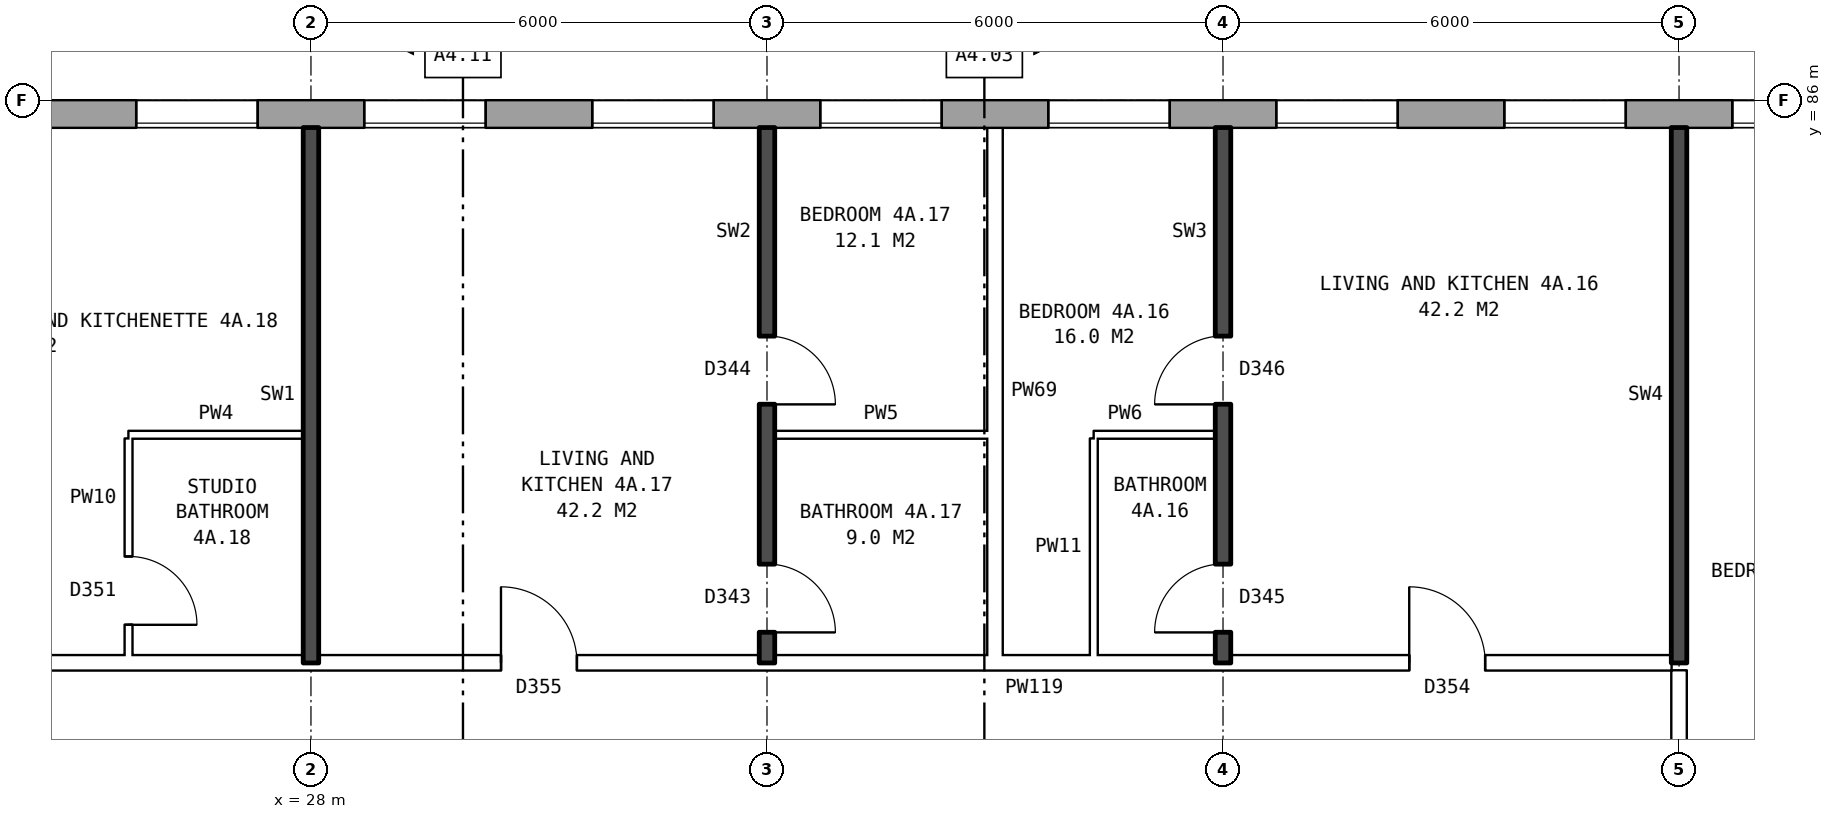
"""IFC4 building model, lengths in metres.
Left out: names, types, materials, properties, quantities, classifications, styles, units other than length and angle.
Written with IfcOpenShell. Run it as: python <this file> out.ifc"""

import sys

from ifc_helpers import new_model, si_unit, direction, frame, frame_2d, origin, place, context, subcontext, project, spatial, rectangle, extrude, element, fill, save


model = new_model("IFC4")
c1 = context("Model", 3, precision=1e-05, world=origin(), true_north=direction((0.0, 1.0)))
c2 = subcontext(c1, "Body", "Model", "MODEL_VIEW")
j1 = project(units=[si_unit("LENGTHUNIT", "METRE"), si_unit("PLANEANGLEUNIT", "RADIAN")], contexts=[c1])
p1 = place(None, origin())
s1 = spatial("IfcSite", under=j1, at=p1, CompositionType="ELEMENT")
p2 = place(p1, origin())
s2 = spatial("IfcBuilding", under=s1, at=p2, CompositionType="ELEMENT")
p3 = place(p2, frame((0.0, 0.0, 19.5)))
s3 = spatial("IfcBuildingStorey", under=s2, at=p3, CompositionType="ELEMENT", Elevation=19.5)
p4 = place(p3, frame((72.925, 85.82, 0.0), z_axis=(0.0, 0.0, 1.0), x_axis=(-1.0, 0.0, 0.0)))
e1 = element("IfcWall", 1, at=p4, inside=s3, PredefinedType="STANDARD", context=c2, shape_type="SweptSolid", body=[
    extrude(rectangle(XDim=50.101, YDim=0.36, at=frame_2d((25.05, 0.0))), origin(), (0.0, 0.0, 1.0), 2.85),
])
p5 = place(p4, frame((0.75, 0.0, 0.8)))
e2 = element("IfcOpeningElement", 2, at=p5, cuts=e1, PredefinedType="OPENING", context=c2, shape_type="SweptSolid", body=[
    extrude(rectangle(XDim=0.6, YDim=0.9, at=frame_2d((0.3, 0.45))), frame((0.0, 0.19, 0.0), z_axis=(0.0, -1.0, 0.0), x_axis=(1.0, 0.0, 0.0)), (0.0, 0.0, 1.0), 0.38),
])
p6 = place(p4, frame((3.625, 0.0, 0.8)))
e3 = element("IfcOpeningElement", 3, at=p6, cuts=e1, PredefinedType="OPENING", context=c2, shape_type="SweptSolid", body=[
    extrude(rectangle(XDim=1.6, YDim=1.8, at=frame_2d((0.8, 0.9))), frame((0.0, 0.19, 0.0), z_axis=(0.0, -1.0, 0.0), x_axis=(1.0, 0.0, 0.0)), (0.0, 0.0, 1.0), 0.38),
])
p7 = place(p4, frame((6.625, 0.0, 0.8)))
e4 = element("IfcOpeningElement", 4, at=p7, cuts=e1, PredefinedType="OPENING", context=c2, shape_type="SweptSolid", body=[
    extrude(rectangle(XDim=1.6, YDim=1.8, at=frame_2d((0.8, 0.9))), frame((0.0, 0.19, 0.0), z_axis=(0.0, -1.0, 0.0), x_axis=(1.0, 0.0, 0.0)), (0.0, 0.0, 1.0), 0.38),
])
p8 = place(p4, frame((9.625, 0.0, 0.8)))
e5 = element("IfcOpeningElement", 5, at=p8, cuts=e1, PredefinedType="OPENING", context=c2, shape_type="SweptSolid", body=[
    extrude(rectangle(XDim=1.6, YDim=1.8, at=frame_2d((0.8, 0.9))), frame((0.0, 0.19, 0.0), z_axis=(0.0, -1.0, 0.0), x_axis=(1.0, 0.0, 0.0)), (0.0, 0.0, 1.0), 0.38),
])
p9 = place(p4, frame((12.625, 0.0, 0.8)))
e6 = element("IfcOpeningElement", 6, at=p9, cuts=e1, PredefinedType="OPENING", context=c2, shape_type="SweptSolid", body=[
    extrude(rectangle(XDim=1.6, YDim=1.8, at=frame_2d((0.8, 0.9))), frame((0.0, 0.19, 0.0), z_axis=(0.0, -1.0, 0.0), x_axis=(1.0, 0.0, 0.0)), (0.0, 0.0, 1.0), 0.38),
])
p10 = place(p4, frame((15.625, 0.0, 0.8)))
e7 = element("IfcOpeningElement", 7, at=p10, cuts=e1, PredefinedType="OPENING", context=c2, shape_type="SweptSolid", body=[
    extrude(rectangle(XDim=1.6, YDim=1.8, at=frame_2d((0.8, 0.9))), frame((0.0, 0.19, 0.0), z_axis=(0.0, -1.0, 0.0), x_axis=(1.0, 0.0, 0.0)), (0.0, 0.0, 1.0), 0.38),
])
p11 = place(p4, frame((18.625, 0.0, 0.8)))
e8 = element("IfcOpeningElement", 8, at=p11, cuts=e1, PredefinedType="OPENING", context=c2, shape_type="SweptSolid", body=[
    extrude(rectangle(XDim=1.6, YDim=1.8, at=frame_2d((0.8, 0.9))), frame((0.0, 0.19, 0.0), z_axis=(0.0, -1.0, 0.0), x_axis=(1.0, 0.0, 0.0)), (0.0, 0.0, 1.0), 0.38),
])
p12 = place(p4, frame((21.625, 0.0, 0.8)))
e9 = element("IfcOpeningElement", 9, at=p12, cuts=e1, PredefinedType="OPENING", context=c2, shape_type="SweptSolid", body=[
    extrude(rectangle(XDim=1.6, YDim=1.8, at=frame_2d((0.8, 0.9))), frame((0.0, 0.19, 0.0), z_axis=(0.0, -1.0, 0.0), x_axis=(1.0, 0.0, 0.0)), (0.0, 0.0, 1.0), 0.38),
])
p13 = place(p4, frame((24.625, 0.0, 0.8)))
e10 = element("IfcOpeningElement", 10, at=p13, cuts=e1, PredefinedType="OPENING", context=c2, shape_type="SweptSolid", body=[
    extrude(rectangle(XDim=1.6, YDim=1.8, at=frame_2d((0.8, 0.9))), frame((0.0, 0.19, 0.0), z_axis=(0.0, -1.0, 0.0), x_axis=(1.0, 0.0, 0.0)), (0.0, 0.0, 1.0), 0.38),
])
p14 = place(p4, frame((27.625, 0.0, 0.8)))
e11 = element("IfcOpeningElement", 11, at=p14, cuts=e1, PredefinedType="OPENING", context=c2, shape_type="SweptSolid", body=[
    extrude(rectangle(XDim=1.6, YDim=1.8, at=frame_2d((0.8, 0.9))), frame((0.0, 0.19, 0.0), z_axis=(0.0, -1.0, 0.0), x_axis=(1.0, 0.0, 0.0)), (0.0, 0.0, 1.0), 0.38),
])
p15 = place(p4, frame((30.625, 0.0, 0.8)))
e12 = element("IfcOpeningElement", 12, at=p15, cuts=e1, PredefinedType="OPENING", context=c2, shape_type="SweptSolid", body=[
    extrude(rectangle(XDim=1.6, YDim=1.8, at=frame_2d((0.8, 0.9))), frame((0.0, 0.19, 0.0), z_axis=(0.0, -1.0, 0.0), x_axis=(1.0, 0.0, 0.0)), (0.0, 0.0, 1.0), 0.38),
])
p16 = place(p4, frame((33.625, 0.0, 0.8)))
e13 = element("IfcOpeningElement", 13, at=p16, cuts=e1, PredefinedType="OPENING", context=c2, shape_type="SweptSolid", body=[
    extrude(rectangle(XDim=1.6, YDim=1.8, at=frame_2d((0.8, 0.9))), frame((0.0, 0.19, 0.0), z_axis=(0.0, -1.0, 0.0), x_axis=(1.0, 0.0, 0.0)), (0.0, 0.0, 1.0), 0.38),
])
p17 = place(p4, frame((36.625, 0.0, 0.8)))
e14 = element("IfcOpeningElement", 14, at=p17, cuts=e1, PredefinedType="OPENING", context=c2, shape_type="SweptSolid", body=[
    extrude(rectangle(XDim=1.6, YDim=1.8, at=frame_2d((0.8, 0.9))), frame((0.0, 0.19, 0.0), z_axis=(0.0, -1.0, 0.0), x_axis=(1.0, 0.0, 0.0)), (0.0, 0.0, 1.0), 0.38),
])
p18 = place(p4, frame((39.625, 0.0, 0.8)))
e15 = element("IfcOpeningElement", 15, at=p18, cuts=e1, PredefinedType="OPENING", context=c2, shape_type="SweptSolid", body=[
    extrude(rectangle(XDim=1.6, YDim=1.8, at=frame_2d((0.8, 0.9))), frame((0.0, 0.19, 0.0), z_axis=(0.0, -1.0, 0.0), x_axis=(1.0, 0.0, 0.0)), (0.0, 0.0, 1.0), 0.38),
])
p19 = place(p4, frame((42.625, 0.0, 0.8)))
e16 = element("IfcOpeningElement", 16, at=p19, cuts=e1, PredefinedType="OPENING", context=c2, shape_type="SweptSolid", body=[
    extrude(rectangle(XDim=1.6, YDim=1.8, at=frame_2d((0.8, 0.9))), frame((0.0, 0.19, 0.0), z_axis=(0.0, -1.0, 0.0), x_axis=(1.0, 0.0, 0.0)), (0.0, 0.0, 1.0), 0.38),
])
p20 = place(p4, frame((45.625, 0.0, 0.8)))
e17 = element("IfcOpeningElement", 17, at=p20, cuts=e1, PredefinedType="OPENING", context=c2, shape_type="SweptSolid", body=[
    extrude(rectangle(XDim=1.6, YDim=1.8, at=frame_2d((0.8, 0.9))), frame((0.0, 0.19, 0.0), z_axis=(0.0, -1.0, 0.0), x_axis=(1.0, 0.0, 0.0)), (0.0, 0.0, 1.0), 0.38),
])
p21 = place(p4, frame((1.65, 0.0, 0.8)))
e18 = element("IfcOpeningElement", 18, at=p21, cuts=e1, PredefinedType="OPENING", context=c2, shape_type="SweptSolid", body=[
    extrude(rectangle(XDim=1.0, YDim=1.5, at=frame_2d((0.5, 0.75))), frame((0.0, 0.19, 0.0), z_axis=(0.0, -1.0, 0.0), x_axis=(1.0, 0.0, 0.0)), (0.0, 0.0, 1.0), 0.38),
])
p22 = place(p3, frame((20.11, 78.6, 0.0), z_axis=(0.0, 0.0, 1.0), x_axis=(1.0, 0.0, 0.0)))
e19 = element("IfcWall", 19, at=p22, inside=s3, PredefinedType="PARTITIONING", context=c2, shape_type="SweptSolid", body=[
    extrude(rectangle(XDim=25.79, YDim=0.2, at=frame_2d((12.895, 0.0))), origin(), (0.0, 0.0, 1.0), 2.85),
])
p23 = place(p22, frame((22.34, 0.0, 0.0)))
e20 = element("IfcOpeningElement", 20, at=p23, cuts=e19, PredefinedType="OPENING", context=c2, shape_type="SweptSolid", body=[
    extrude(rectangle(XDim=1.0, YDim=2.1, at=frame_2d((0.5, 1.05))), frame((0.0, 0.11, 0.0), z_axis=(0.0, -1.0, 0.0), x_axis=(1.0, 0.0, 0.0)), (0.0, 0.0, 1.0), 0.22),
])
p24 = place(p22, frame((10.39, 0.0, 0.0)))
e21 = element("IfcOpeningElement", 21, at=p24, cuts=e19, PredefinedType="OPENING", context=c2, shape_type="SweptSolid", body=[
    extrude(rectangle(XDim=1.0, YDim=2.1, at=frame_2d((0.5, 1.05))), frame((0.0, 0.11, 0.0), z_axis=(0.0, -1.0, 0.0), x_axis=(1.0, 0.0, 0.0)), (0.0, 0.0, 1.0), 0.22),
])
p25 = place(p22, frame((2.245, 0.0, 0.0)))
e22 = element("IfcOpeningElement", 22, at=p25, cuts=e19, PredefinedType="OPENING", context=c2, shape_type="SweptSolid", body=[
    extrude(rectangle(XDim=1.0, YDim=2.1, at=frame_2d((0.5, 1.05))), frame((0.0, 0.11, 0.0), z_axis=(0.0, -1.0, 0.0), x_axis=(1.0, 0.0, 0.0)), (0.0, 0.0, 1.0), 0.22),
])
p26 = place(p3, frame((25.6, 81.6, 0.0), z_axis=(0.0, 0.0, 1.0), x_axis=(1.0, 0.0, 0.0)))
e23 = element("IfcWall", 23, at=p26, inside=s3, PredefinedType="PARTITIONING", context=c2, shape_type="SweptSolid", body=[
    extrude(rectangle(XDim=2.3, YDim=0.1, at=frame_2d((1.15, 0.0))), origin(), (0.0, 0.0, 1.0), 2.85),
])
p27 = place(p3, frame((34.1, 81.6, 0.0), z_axis=(0.0, 0.0, 1.0), x_axis=(1.0, 0.0, 0.0)))
e24 = element("IfcWall", 24, at=p27, inside=s3, PredefinedType="PARTITIONING", context=c2, shape_type="SweptSolid", body=[
    extrude(rectangle(XDim=2.8, YDim=0.1, at=frame_2d((1.4, 0.0))), origin(), (0.0, 0.0, 1.0), 2.85),
])
p28 = place(p3, frame((38.3, 81.6, 0.0), z_axis=(0.0, 0.0, 1.0), x_axis=(1.0, 0.0, 0.0)))
e25 = element("IfcWall", 25, at=p28, inside=s3, PredefinedType="PARTITIONING", context=c2, shape_type="SweptSolid", body=[
    extrude(rectangle(XDim=1.6, YDim=0.1, at=frame_2d((0.8, 0.0))), origin(), (0.0, 0.0, 1.0), 2.85),
])
p29 = place(p3, frame((25.6, 78.7, 0.0), z_axis=(0.0, 0.0, 1.0), x_axis=(0.0, 1.0, 0.0)))
e26 = element("IfcWall", 26, at=p29, inside=s3, PredefinedType="PARTITIONING", context=c2, shape_type="SweptSolid", body=[
    extrude(rectangle(XDim=2.85, YDim=0.1, at=frame_2d((1.425, 0.0))), origin(), (0.0, 0.0, 1.0), 2.85),
])
p30 = place(p29, frame((0.4, 0.0, 0.0)))
e27 = element("IfcOpeningElement", 27, at=p30, cuts=e26, PredefinedType="OPENING", context=c2, shape_type="SweptSolid", body=[
    extrude(rectangle(XDim=0.9, YDim=2.1, at=frame_2d((0.45, 1.05))), frame((0.0, 0.06, 0.0), z_axis=(0.0, -1.0, 0.0), x_axis=(1.0, 0.0, 0.0)), (0.0, 0.0, 1.0), 0.12),
])
p31 = place(p3, frame((28.0, 78.6, 0.0), z_axis=(0.0, 0.0, 1.0), x_axis=(0.0, 1.0, 0.0)))
e28 = element("IfcWall", 28, at=p31, inside=s3, PredefinedType="SOLIDWALL", context=c2, shape_type="SweptSolid", body=[
    extrude(rectangle(XDim=7.04, YDim=0.2, at=frame_2d((3.52, 0.0))), origin(), (0.0, 0.0, 1.0), 2.85),
])
p32 = place(p3, frame((34.0, 78.6, 0.0), z_axis=(0.0, 0.0, 1.0), x_axis=(0.0, 1.0, 0.0)))
e29 = element("IfcWall", 29, at=p32, inside=s3, PredefinedType="SOLIDWALL", context=c2, shape_type="SweptSolid", body=[
    extrude(rectangle(XDim=7.04, YDim=0.2, at=frame_2d((3.52, 0.0))), origin(), (0.0, 0.0, 1.0), 2.85),
])
p33 = place(p32, frame((3.4, 0.0, 0.0)))
e30 = element("IfcOpeningElement", 30, at=p33, cuts=e29, PredefinedType="OPENING", context=c2, shape_type="SweptSolid", body=[
    extrude(rectangle(XDim=0.9, YDim=2.1, at=frame_2d((0.45, 1.05))), frame((0.0, 0.11, 0.0), z_axis=(0.0, -1.0, 0.0), x_axis=(1.0, 0.0, 0.0)), (0.0, 0.0, 1.0), 0.22),
])
p34 = place(p32, frame((0.4, 0.0, 0.0)))
e31 = element("IfcOpeningElement", 31, at=p34, cuts=e29, PredefinedType="OPENING", context=c2, shape_type="SweptSolid", body=[
    extrude(rectangle(XDim=0.9, YDim=2.1, at=frame_2d((0.45, 1.05))), frame((0.0, 0.11, 0.0), z_axis=(0.0, -1.0, 0.0), x_axis=(1.0, 0.0, 0.0)), (0.0, 0.0, 1.0), 0.22),
])
p35 = place(p3, frame((37.0, 78.7, 0.0), z_axis=(0.0, 0.0, 1.0), x_axis=(0.0, 1.0, 0.0)))
e32 = element("IfcWall", 32, at=p35, inside=s3, PredefinedType="PARTITIONING", context=c2, shape_type="SweptSolid", body=[
    extrude(rectangle(XDim=6.94, YDim=0.2, at=frame_2d((3.47, 0.0))), origin(), (0.0, 0.0, 1.0), 2.85),
])
p36 = place(p3, frame((38.3, 78.7, 0.0), z_axis=(0.0, 0.0, 1.0), x_axis=(0.0, 1.0, 0.0)))
e33 = element("IfcWall", 33, at=p36, inside=s3, PredefinedType="PARTITIONING", context=c2, shape_type="SweptSolid", body=[
    extrude(rectangle(XDim=2.85, YDim=0.1, at=frame_2d((1.425, 0.0))), origin(), (0.0, 0.0, 1.0), 2.85),
])
p37 = place(p3, frame((40.0, 78.6, 0.0), z_axis=(0.0, 0.0, 1.0), x_axis=(0.0, 1.0, 0.0)))
e34 = element("IfcWall", 34, at=p37, inside=s3, PredefinedType="SOLIDWALL", context=c2, shape_type="SweptSolid", body=[
    extrude(rectangle(XDim=7.04, YDim=0.2, at=frame_2d((3.52, 0.0))), origin(), (0.0, 0.0, 1.0), 2.85),
])
p38 = place(p37, frame((3.4, 0.0, 0.0)))
e35 = element("IfcOpeningElement", 35, at=p38, cuts=e34, PredefinedType="OPENING", context=c2, shape_type="SweptSolid", body=[
    extrude(rectangle(XDim=0.9, YDim=2.1, at=frame_2d((0.45, 1.05))), frame((0.0, 0.11, 0.0), z_axis=(0.0, -1.0, 0.0), x_axis=(1.0, 0.0, 0.0)), (0.0, 0.0, 1.0), 0.22),
])
p39 = place(p37, frame((0.4, 0.0, 0.0)))
e36 = element("IfcOpeningElement", 36, at=p39, cuts=e34, PredefinedType="OPENING", context=c2, shape_type="SweptSolid", body=[
    extrude(rectangle(XDim=0.9, YDim=2.1, at=frame_2d((0.45, 1.05))), frame((0.0, 0.11, 0.0), z_axis=(0.0, -1.0, 0.0), x_axis=(1.0, 0.0, 0.0)), (0.0, 0.0, 1.0), 0.22),
])
p40 = place(p3, frame((46.0, 76.3, 0.0), z_axis=(0.0, 0.0, 1.0), x_axis=(0.0, 1.0, 0.0)))
e37 = element("IfcWall", 37, at=p40, inside=s3, PredefinedType="PARTITIONING", context=c2, shape_type="SweptSolid", body=[
    extrude(rectangle(XDim=2.2, YDim=0.2, at=frame_2d((1.1, 0.0))), origin(), (0.0, 0.0, 1.0), 2.85),
])
p41 = place(p3, frame((46.0, 78.6, 0.0), z_axis=(0.0, 0.0, 1.0), x_axis=(0.0, 1.0, 0.0)))
e38 = element("IfcWall", 38, at=p41, inside=s3, PredefinedType="SOLIDWALL", context=c2, shape_type="SweptSolid", body=[
    extrude(rectangle(XDim=7.04, YDim=0.2, at=frame_2d((3.52, 0.0))), origin(), (0.0, 0.0, 1.0), 2.85),
])
p42 = place(p13, origin())
e39 = element("IfcWindow", 39, at=p42, inside=s3, PartitioningType="SINGLE_PANEL", PredefinedType="WINDOW", context=c2, shape_type="SweptSolid", body=[
    extrude(rectangle(XDim=1.6, YDim=1.8, at=frame_2d((0.8, 0.9))), frame((0.0, 0.15, 0.0), z_axis=(0.0, -1.0, 0.0), x_axis=(1.0, 0.0, 0.0)), (0.0, 0.0, 1.0), 0.06),
])
fill(e10, e39)
p43 = place(p14, origin())
e40 = element("IfcWindow", 40, at=p43, inside=s3, PartitioningType="SINGLE_PANEL", PredefinedType="WINDOW", context=c2, shape_type="SweptSolid", body=[
    extrude(rectangle(XDim=1.6, YDim=1.8, at=frame_2d((0.8, 0.9))), frame((0.0, 0.15, 0.0), z_axis=(0.0, -1.0, 0.0), x_axis=(1.0, 0.0, 0.0)), (0.0, 0.0, 1.0), 0.06),
])
fill(e11, e40)
p44 = place(p15, origin())
e41 = element("IfcWindow", 41, at=p44, inside=s3, PartitioningType="SINGLE_PANEL", PredefinedType="WINDOW", context=c2, shape_type="SweptSolid", body=[
    extrude(rectangle(XDim=1.6, YDim=1.8, at=frame_2d((0.8, 0.9))), frame((0.0, 0.15, 0.0), z_axis=(0.0, -1.0, 0.0), x_axis=(1.0, 0.0, 0.0)), (0.0, 0.0, 1.0), 0.06),
])
fill(e12, e41)
p45 = place(p16, origin())
e42 = element("IfcWindow", 42, at=p45, inside=s3, PartitioningType="SINGLE_PANEL", PredefinedType="WINDOW", context=c2, shape_type="SweptSolid", body=[
    extrude(rectangle(XDim=1.6, YDim=1.8, at=frame_2d((0.8, 0.9))), frame((0.0, 0.15, 0.0), z_axis=(0.0, -1.0, 0.0), x_axis=(1.0, 0.0, 0.0)), (0.0, 0.0, 1.0), 0.06),
])
fill(e13, e42)
p46 = place(p17, origin())
e43 = element("IfcWindow", 43, at=p46, inside=s3, PartitioningType="SINGLE_PANEL", PredefinedType="WINDOW", context=c2, shape_type="SweptSolid", body=[
    extrude(rectangle(XDim=1.6, YDim=1.8, at=frame_2d((0.8, 0.9))), frame((0.0, 0.15, 0.0), z_axis=(0.0, -1.0, 0.0), x_axis=(1.0, 0.0, 0.0)), (0.0, 0.0, 1.0), 0.06),
])
fill(e14, e43)
p47 = place(p18, origin())
e44 = element("IfcWindow", 44, at=p47, inside=s3, PartitioningType="SINGLE_PANEL", PredefinedType="WINDOW", context=c2, shape_type="SweptSolid", body=[
    extrude(rectangle(XDim=1.6, YDim=1.8, at=frame_2d((0.8, 0.9))), frame((0.0, 0.15, 0.0), z_axis=(0.0, -1.0, 0.0), x_axis=(1.0, 0.0, 0.0)), (0.0, 0.0, 1.0), 0.06),
])
fill(e15, e44)
p48 = place(p19, origin())
e45 = element("IfcWindow", 45, at=p48, inside=s3, PartitioningType="SINGLE_PANEL", PredefinedType="WINDOW", context=c2, shape_type="SweptSolid", body=[
    extrude(rectangle(XDim=1.6, YDim=1.8, at=frame_2d((0.8, 0.9))), frame((0.0, 0.15, 0.0), z_axis=(0.0, -1.0, 0.0), x_axis=(1.0, 0.0, 0.0)), (0.0, 0.0, 1.0), 0.06),
])
fill(e16, e45)
p49 = place(p20, origin())
e46 = element("IfcWindow", 46, at=p49, inside=s3, PartitioningType="SINGLE_PANEL", PredefinedType="WINDOW", context=c2, shape_type="SweptSolid", body=[
    extrude(rectangle(XDim=1.6, YDim=1.8, at=frame_2d((0.8, 0.9))), frame((0.0, 0.15, 0.0), z_axis=(0.0, -1.0, 0.0), x_axis=(1.0, 0.0, 0.0)), (0.0, 0.0, 1.0), 0.06),
])
fill(e17, e46)
p50 = place(p38, origin())
e47 = element("IfcDoor", 47, at=p50, inside=s3, OperationType="SINGLE_SWING_LEFT", PredefinedType="DOOR", context=c2, shape_type="SweptSolid", body=[
    extrude(rectangle(XDim=0.9, YDim=2.1, at=frame_2d((0.45, 1.05))), frame((0.0, 0.025, 0.0), z_axis=(0.0, -1.0, 0.0), x_axis=(1.0, 0.0, 0.0)), (0.0, 0.0, 1.0), 0.05),
])
fill(e35, e47)
p51 = place(p23, origin())
e48 = element("IfcDoor", 48, at=p51, inside=s3, OperationType="SINGLE_SWING_LEFT", PredefinedType="DOOR", context=c2, shape_type="SweptSolid", body=[
    extrude(rectangle(XDim=1.0, YDim=2.1, at=frame_2d((0.5, 1.05))), frame((0.0, 0.025, 0.0), z_axis=(0.0, -1.0, 0.0), x_axis=(1.0, 0.0, 0.0)), (0.0, 0.0, 1.0), 0.05),
])
fill(e20, e48)
p52 = place(p39, origin())
e49 = element("IfcDoor", 49, at=p52, inside=s3, OperationType="SINGLE_SWING_LEFT", PredefinedType="DOOR", context=c2, shape_type="SweptSolid", body=[
    extrude(rectangle(XDim=0.9, YDim=2.1, at=frame_2d((0.45, 1.05))), frame((0.0, 0.025, 0.0), z_axis=(0.0, -1.0, 0.0), x_axis=(1.0, 0.0, 0.0)), (0.0, 0.0, 1.0), 0.05),
])
fill(e36, e49)
p53 = place(p33, frame((0.9, 0.0, 0.0), z_axis=(0.0, 0.0, 1.0), x_axis=(-1.0, 0.0, 0.0)))
e50 = element("IfcDoor", 50, at=p53, inside=s3, OperationType="SINGLE_SWING_RIGHT", PredefinedType="DOOR", context=c2, shape_type="SweptSolid", body=[
    extrude(rectangle(XDim=0.9, YDim=2.1, at=frame_2d((0.45, 1.05))), frame((0.0, 0.025, 0.0), z_axis=(0.0, -1.0, 0.0), x_axis=(1.0, 0.0, 0.0)), (0.0, 0.0, 1.0), 0.05),
])
fill(e30, e50)
p54 = place(p24, origin())
e51 = element("IfcDoor", 51, at=p54, inside=s3, OperationType="SINGLE_SWING_LEFT", PredefinedType="DOOR", context=c2, shape_type="SweptSolid", body=[
    extrude(rectangle(XDim=1.0, YDim=2.1, at=frame_2d((0.5, 1.05))), frame((0.0, 0.025, 0.0), z_axis=(0.0, -1.0, 0.0), x_axis=(1.0, 0.0, 0.0)), (0.0, 0.0, 1.0), 0.05),
])
fill(e21, e51)
p55 = place(p34, frame((0.9, 0.0, 0.0), z_axis=(0.0, 0.0, 1.0), x_axis=(-1.0, 0.0, 0.0)))
e52 = element("IfcDoor", 52, at=p55, inside=s3, OperationType="SINGLE_SWING_RIGHT", PredefinedType="DOOR", context=c2, shape_type="SweptSolid", body=[
    extrude(rectangle(XDim=0.9, YDim=2.1, at=frame_2d((0.45, 1.05))), frame((0.0, 0.025, 0.0), z_axis=(0.0, -1.0, 0.0), x_axis=(1.0, 0.0, 0.0)), (0.0, 0.0, 1.0), 0.05),
])
fill(e31, e52)
p56 = place(p30, frame((0.9, 0.0, 0.0), z_axis=(0.0, 0.0, 1.0), x_axis=(-1.0, 0.0, 0.0)))
e53 = element("IfcDoor", 53, at=p56, inside=s3, OperationType="SINGLE_SWING_RIGHT", PredefinedType="DOOR", context=c2, shape_type="SweptSolid", body=[
    extrude(rectangle(XDim=0.9, YDim=2.1, at=frame_2d((0.45, 1.05))), frame((0.0, 0.025, 0.0), z_axis=(0.0, -1.0, 0.0), x_axis=(1.0, 0.0, 0.0)), (0.0, 0.0, 1.0), 0.05),
])
fill(e27, e53)
save(model, sys.argv[1])
